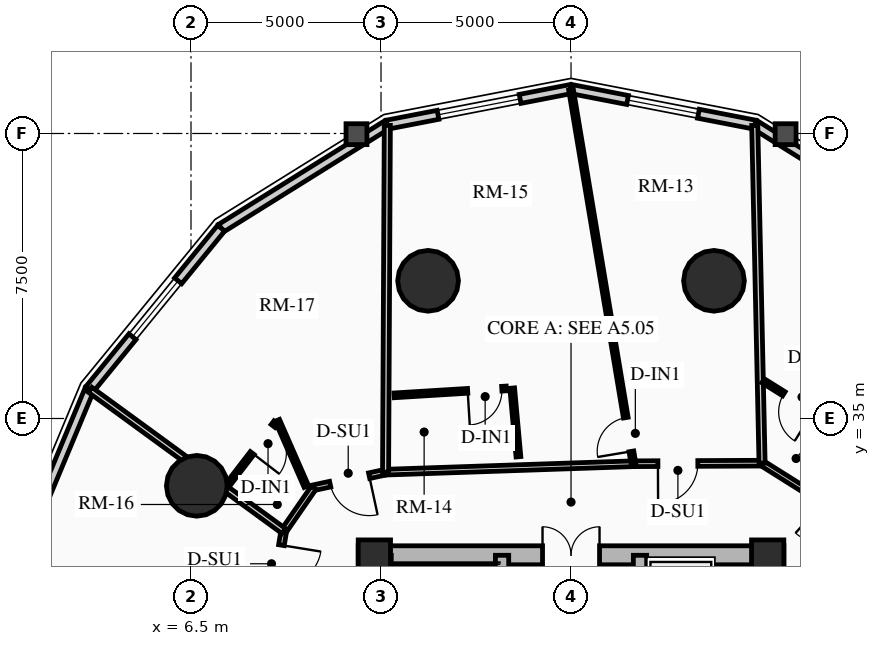
"""IFC4 building model, lengths in metres.
Left out: names, types, materials, properties, quantities, classifications, styles, units other than length and angle.
Written with IfcOpenShell. Run it as: python <this file> out.ifc"""

import sys

from ifc_helpers import new_model, si_unit, direction, frame, frame_2d, origin, origin_2d, place, context, subcontext, project, spatial, rectangle, circle, extrude, source, transform, mapped, element, fill, save


model = new_model("IFC4")
c1 = context("Model", 3, precision=1e-05, world=origin(), true_north=direction((0.0, 1.0)))
c2 = subcontext(c1, "Body", "Model", "MODEL_VIEW")
j1 = project(units=[si_unit("LENGTHUNIT", "METRE"), si_unit("PLANEANGLEUNIT", "RADIAN")], contexts=[c1])
p1 = place(None, origin())
s1 = spatial("IfcSite", under=j1, at=p1, CompositionType="ELEMENT")
p2 = place(p1, origin())
s2 = spatial("IfcBuilding", under=s1, at=p2, CompositionType="ELEMENT")
p3 = place(p2, frame((0.0, 0.0, 54.01)))
s3 = spatial("IfcBuildingStorey", under=s2, at=p3, CompositionType="ELEMENT", Elevation=54.01)
for number, where, z_axis, x_axis in (
    (1, (11.15, 17.35, 0.0), (0.0, 0.0, 1.0), (0.0, 1.0, 0.0)),
    (2, (21.85, 17.35, 0.0), (0.0, 0.0, 1.0), (0.0, 1.0, 0.0)),
):
    element("IfcWall", number, at=place(p3, frame(where, z_axis=z_axis, x_axis=x_axis)), inside=s3, PredefinedType="SHEAR", context=c2, shape_type="SweptSolid", body=[
        extrude(rectangle(XDim=14.3, YDim=0.5, at=frame_2d((7.15, 0.0))), origin(), (0.0, 0.0, 1.0), 2.91),
    ])
p4 = place(p3, frame((11.15, 31.4, 0.0), z_axis=(0.0, 0.0, 1.0), x_axis=(1.0, 0.0, 0.0)))
e3 = element("IfcWall", 3, at=p4, inside=s3, PredefinedType="SHEAR", context=c2, shape_type="SweptSolid", body=[
    extrude(rectangle(XDim=10.7, YDim=0.5, at=frame_2d((5.35, 0.0))), origin(), (0.0, 0.0, 1.0), 2.91),
])
m1 = source(origin(), c2, "Body", "SweptSolid", [
    extrude(rectangle(XDim=1.5, YDim=2.02, at=frame_2d((0.75, 1.01))), frame((0.0, 0.26, 0.0), z_axis=(0.0, -1.0, 0.0), x_axis=(1.0, 0.0, 0.0)), (0.0, 0.0, 1.0), 0.52),
])
p5 = place(p4, frame((4.6, 0.0, 0.0)))
e4 = element("IfcOpeningElement", 4, at=p5, cuts=e3, PredefinedType="OPENING", context=c2, shape_type="MappedRepresentation", body=[
    mapped(m1, transform((0.0, 0.0, 0.0), x_axis=(1.0, 0.0, 0.0), y_axis=(0.0, 1.0, 0.0), z_axis=(0.0, 0.0, 1.0), scale=1.0)),
])
p6 = place(p3, frame((14.685, 17.6, 0.0), z_axis=(0.0, 0.0, 1.0), x_axis=(0.0, 1.0, 0.0)))
e5 = element("IfcWall", 5, at=p6, inside=s3, PredefinedType="SHEAR", context=c2, shape_type="SweptSolid", body=[
    extrude(rectangle(XDim=13.8, YDim=0.35, at=frame_2d((6.9, 0.0))), origin(), (0.0, 0.0, 1.0), 2.91),
])
m2 = source(origin(), c2, "Body", "SweptSolid", [
    extrude(rectangle(XDim=1.1, YDim=2.015, at=frame_2d((0.55, 1.007))), frame((0.0, 0.185, 0.0), z_axis=(0.0, -1.0, 0.0), x_axis=(1.0, 0.0, 0.0)), (0.0, 0.0, 1.0), 0.37),
])
p7 = place(p6, frame((4.9, 0.0, 0.0)))
e6 = element("IfcOpeningElement", 6, at=p7, cuts=e5, PredefinedType="OPENING", context=c2, shape_type="MappedRepresentation", body=[
    mapped(m2, transform((0.0, 0.0, 0.0), x_axis=(1.0, 0.0, 0.0), y_axis=(0.0, 1.0, 0.0), z_axis=(0.0, 0.0, 1.0), scale=1.0)),
])
m3 = source(origin(), c2, "Body", "SweptSolid", [
    extrude(rectangle(XDim=1.15, YDim=2.02, at=frame_2d((0.575, 1.01))), frame((0.0, 0.185, 0.0), z_axis=(0.0, -1.0, 0.0), x_axis=(1.0, 0.0, 0.0)), (0.0, 0.0, 1.0), 0.37),
])
p8 = place(p6, frame((7.32, 0.0, 0.0)))
e7 = element("IfcOpeningElement", 7, at=p8, cuts=e5, PredefinedType="OPENING", context=c2, shape_type="MappedRepresentation", body=[
    mapped(m3, transform((0.0, 0.0, 0.0), x_axis=(1.0, 0.0, 0.0), y_axis=(0.0, 1.0, 0.0), z_axis=(0.0, 0.0, 1.0), scale=1.0)),
])
p9 = place(p3, frame((18.315, 17.6, 0.0), z_axis=(0.0, 0.0, 1.0), x_axis=(0.0, 1.0, 0.0)))
e8 = element("IfcWall", 8, at=p9, inside=s3, PredefinedType="SHEAR", context=c2, shape_type="SweptSolid", body=[
    extrude(rectangle(XDim=13.8, YDim=0.35, at=frame_2d((6.9, 0.0))), origin(), (0.0, 0.0, 1.0), 2.91),
])
p10 = place(p9, frame((10.025, 0.0, 0.0)))
e9 = element("IfcOpeningElement", 9, at=p10, cuts=e8, PredefinedType="OPENING", context=c2, shape_type="MappedRepresentation", body=[
    mapped(m2, transform((0.0, 0.0, 0.0), x_axis=(1.0, 0.0, 0.0), y_axis=(0.0, 1.0, 0.0), z_axis=(0.0, 0.0, 1.0), scale=1.0)),
])
p11 = place(p9, frame((12.025, 0.0, 0.0)))
e10 = element("IfcOpeningElement", 10, at=p11, cuts=e8, PredefinedType="OPENING", context=c2, shape_type="MappedRepresentation", body=[
    mapped(m2, transform((0.0, 0.0, 0.0), x_axis=(1.0, 0.0, 0.0), y_axis=(0.0, 1.0, 0.0), z_axis=(0.0, 0.0, 1.0), scale=1.0)),
])
p12 = place(p9, frame((5.33, 0.0, 0.0)))
e11 = element("IfcOpeningElement", 11, at=p12, cuts=e8, PredefinedType="OPENING", context=c2, shape_type="MappedRepresentation", body=[
    mapped(m3, transform((0.0, 0.0, 0.0), x_axis=(1.0, 0.0, 0.0), y_axis=(0.0, 1.0, 0.0), z_axis=(0.0, 0.0, 1.0), scale=1.0)),
])
p13 = place(p3, frame((11.595, 24.655, 0.0), z_axis=(0.0, 0.0, 1.0), x_axis=(0.0, 1.0, 0.0)))
e12 = element("IfcWall", 12, at=p13, inside=s3, PredefinedType="SHEAR", context=c2, shape_type="SweptSolid", body=[
    extrude(rectangle(XDim=6.745, YDim=0.35, at=frame_2d((3.373, 0.0))), origin(), (0.0, 0.0, 1.0), 2.91),
])
for number, where, z_axis, x_axis in (
    (13, (11.325, 31.38, 0.0), (0.0, 0.0, 1.0), (1.0, 0.0, 0.0)),
    (14, (21.675, 31.38, 0.0), (0.0, 0.0, 1.0), (1.0, 0.0, 0.0)),
):
    element("IfcColumn", number, at=place(p3, frame(where, z_axis=z_axis, x_axis=x_axis)), inside=s3, PredefinedType="COLUMN", context=c2, shape_type="SweptSolid", body=[
        extrude(rectangle(XDim=0.85, YDim=0.85, at=origin_2d()), origin(), (0.0, 0.0, 1.0), 2.91),
    ])
for number, where, z_axis, x_axis in (
    (15, (20.261, 38.623, 0.0), (0.0, 0.0, 1.0), (1.0, 0.0, 0.0)),
    (16, (12.739, 38.623, 0.0), (0.0, 0.0, 1.0), (1.0, 0.0, 0.0)),
    (17, (6.653, 33.229, 0.0), (0.0, 0.0, 1.0), (1.0, 0.0, 0.0)),
):
    element("IfcColumn", number, at=place(p3, frame(where, z_axis=z_axis, x_axis=x_axis)), inside=s3, PredefinedType="USERDEFINED", context=c2, shape_type="SweptSolid", body=[
        extrude(circle(Radius=0.8, at=origin_2d()), origin(), (0.0, 0.0, 1.0), 2.91),
    ])
p14 = place(p3, frame((21.34, 42.732, 0.0), z_axis=(0.0, 0.0, 1.0), x_axis=(0.848533613342, -0.529141481107, 0.0)))
e18 = element("IfcWall", 18, at=p14, inside=s3, PredefinedType="SOLIDWALL", context=c2, shape_type="SweptSolid", body=[
    extrude(rectangle(XDim=5.146, YDim=0.24, at=frame_2d((2.573, 0.0))), origin(), (0.0, 0.0, 1.0), 2.073),
])
p15 = place(p3, frame((16.5, 43.67, 0.0), z_axis=(0.0, 0.0, 1.0), x_axis=(0.981725274071, -0.190303668512, 0.0)))
e19 = element("IfcWall", 19, at=p15, inside=s3, PredefinedType="SOLIDWALL", context=c2, shape_type="SweptSolid", body=[
    extrude(rectangle(XDim=4.93, YDim=0.24, at=frame_2d((2.465, 0.0))), origin(), (0.0, 0.0, 1.0), 2.073),
])
m4 = source(origin(), c2, "Body", "SweptSolid", [
    extrude(rectangle(XDim=1.9, YDim=1.35, at=frame_2d((0.95, 0.675))), frame((0.0, 0.13, 0.0), z_axis=(0.0, -1.0, 0.0), x_axis=(1.0, 0.0, 0.0)), (0.0, 0.0, 1.0), 0.26),
])
p16 = place(p15, frame((1.515, 0.0, 0.65)))
e20 = element("IfcOpeningElement", 20, at=p16, cuts=e19, PredefinedType="OPENING", context=c2, shape_type="MappedRepresentation", body=[
    mapped(m4, transform((0.0, 0.0, 0.0), x_axis=(1.0, 0.0, 0.0), y_axis=(0.0, 1.0, 0.0), z_axis=(0.0, 0.0, 1.0), scale=1.0)),
])
p17 = place(p3, frame((11.66, 42.732, 0.0), z_axis=(0.0, 0.0, 1.0), x_axis=(0.981725274071, 0.190303668512, 0.0)))
e21 = element("IfcWall", 21, at=p17, inside=s3, PredefinedType="SOLIDWALL", context=c2, shape_type="SweptSolid", body=[
    extrude(rectangle(XDim=4.93, YDim=0.24, at=frame_2d((2.465, 0.0))), origin(), (0.0, 0.0, 1.0), 2.073),
])
m5 = source(origin(), c2, "Body", "SweptSolid", [
    extrude(rectangle(XDim=2.2, YDim=1.35, at=frame_2d((1.1, 0.675))), frame((0.0, 0.13, 0.0), z_axis=(0.0, -1.0, 0.0), x_axis=(1.0, 0.0, 0.0)), (0.0, 0.0, 1.0), 0.26),
])
p18 = place(p17, frame((1.365, 0.0, 0.65)))
e22 = element("IfcOpeningElement", 22, at=p18, cuts=e21, PredefinedType="OPENING", context=c2, shape_type="MappedRepresentation", body=[
    mapped(m5, transform((0.0, 0.0, 0.0), x_axis=(1.0, 0.0, 0.0), y_axis=(0.0, 1.0, 0.0), z_axis=(0.0, 0.0, 1.0), scale=1.0)),
])
p19 = place(p3, frame((7.293, 40.009, 0.0), z_axis=(0.0, 0.0, 1.0), x_axis=(0.848533613342, 0.529141481107, 0.0)))
e23 = element("IfcWall", 23, at=p19, inside=s3, PredefinedType="SOLIDWALL", context=c2, shape_type="SweptSolid", body=[
    extrude(rectangle(XDim=5.146, YDim=0.24, at=frame_2d((2.573, 0.0))), origin(), (0.0, 0.0, 1.0), 2.073),
])
p20 = place(p3, frame((3.828, 35.768, 0.0), z_axis=(0.0, 0.0, 1.0), x_axis=(0.632713287022, 0.77438614168, 0.0)))
e24 = element("IfcWall", 24, at=p20, inside=s3, PredefinedType="SOLIDWALL", context=c2, shape_type="SweptSolid", body=[
    extrude(rectangle(XDim=5.477, YDim=0.24, at=frame_2d((2.738, 0.0))), origin(), (0.0, 0.0, 1.0), 2.073),
])
p21 = place(p20, frame((1.788, 0.0, 0.65)))
e25 = element("IfcOpeningElement", 25, at=p21, cuts=e24, PredefinedType="OPENING", context=c2, shape_type="MappedRepresentation", body=[
    mapped(m4, transform((0.0, 0.0, 0.0), x_axis=(1.0, 0.0, 0.0), y_axis=(0.0, 1.0, 0.0), z_axis=(0.0, 0.0, 1.0), scale=1.0)),
])
p22 = place(p3, frame((1.604, 30.424, 0.0), z_axis=(0.0, 0.0, 1.0), x_axis=(0.384348836956, 0.923187939442, 0.0)))
e26 = element("IfcWall", 26, at=p22, inside=s3, PredefinedType="SOLIDWALL", context=c2, shape_type="SweptSolid", body=[
    extrude(rectangle(XDim=5.789, YDim=0.24, at=frame_2d((2.894, 0.0))), origin(), (0.0, 0.0, 1.0), 2.073),
])
p23 = place(p3, frame((22.877, 32.976, 0.0), z_axis=(0.0, 0.0, 1.0), x_axis=(-0.846723232687, 0.532033614754, 0.0)))
e27 = element("IfcWall", 27, at=p23, inside=s3, PredefinedType="PARTITIONING", context=c2, shape_type="SweptSolid", body=[
    extrude(rectangle(XDim=1.595, YDim=0.15, at=frame_2d((0.797, 0.0))), origin(), (0.0, 0.0, 1.0), 2.205),
])
p24 = place(p3, frame((21.527, 33.824, 0.0), z_axis=(0.0, 0.0, 1.0), x_axis=(-0.999990631344, -0.00432865146, 0.0)))
e28 = element("IfcWall", 28, at=p24, inside=s3, PredefinedType="PARTITIONING", context=c2, shape_type="SweptSolid", body=[
    extrude(rectangle(XDim=3.384, YDim=0.15, at=frame_2d((1.692, 0.0))), origin(), (0.0, 0.0, 1.0), 2.159),
])
m6 = source(origin(), c2, "Body", "SweptSolid", [
    extrude(rectangle(XDim=1.05, YDim=2.015, at=frame_2d((0.525, 1.007))), frame((0.0, 0.085, 0.0), z_axis=(0.0, -1.0, 0.0), x_axis=(1.0, 0.0, 0.0)), (0.0, 0.0, 1.0), 0.17),
])
p25 = place(p24, frame((1.69, 0.0, 0.0)))
e29 = element("IfcOpeningElement", 29, at=p25, cuts=e28, PredefinedType="OPENING", context=c2, shape_type="MappedRepresentation", body=[
    mapped(m6, transform((0.0, 0.0, 0.0), x_axis=(1.0, 0.0, 0.0), y_axis=(0.0, 1.0, 0.0), z_axis=(0.0, 0.0, 1.0), scale=1.0)),
])
p26 = place(p3, frame((18.143, 33.81, 0.0), z_axis=(0.0, 0.0, 1.0), x_axis=(-0.999423023908, -0.033964971394, 0.0)))
e30 = element("IfcWall", 30, at=p26, inside=s3, PredefinedType="PARTITIONING", context=c2, shape_type="SweptSolid", body=[
    extrude(rectangle(XDim=6.527, YDim=0.15, at=frame_2d((3.263, 0.0))), origin(), (0.0, 0.0, 1.0), 2.159),
])
p27 = place(p3, frame((11.62, 33.588, 0.0), z_axis=(0.0, 0.0, 1.0), x_axis=(-0.977392314559, -0.211433827571, 0.0)))
e31 = element("IfcWall", 31, at=p27, inside=s3, PredefinedType="PARTITIONING", context=c2, shape_type="SweptSolid", body=[
    extrude(rectangle(XDim=1.934, YDim=0.15, at=frame_2d((0.967, 0.0))), origin(), (0.0, 0.0, 1.0), 2.159),
])
p28 = place(p27, frame((0.442, 0.0, 0.0)))
e32 = element("IfcOpeningElement", 32, at=p28, cuts=e31, PredefinedType="OPENING", context=c2, shape_type="MappedRepresentation", body=[
    mapped(m6, transform((0.0, 0.0, 0.0), x_axis=(1.0, 0.0, 0.0), y_axis=(0.0, 1.0, 0.0), z_axis=(0.0, 0.0, 1.0), scale=1.0)),
])
p29 = place(p3, frame((9.729, 33.179, 0.0), z_axis=(0.0, 0.0, 1.0), x_axis=(-0.569155068352, -0.822230203878, 0.0)))
e33 = element("IfcWall", 33, at=p29, inside=s3, PredefinedType="PARTITIONING", context=c2, shape_type="SweptSolid", body=[
    extrude(rectangle(XDim=1.387, YDim=0.15, at=frame_2d((0.694, 0.0))), origin(), (0.0, 0.0, 1.0), 2.159),
])
p30 = place(p3, frame((8.94, 32.038, 0.0), z_axis=(0.0, 0.0, 1.0), x_axis=(-0.159917336462, -0.987130409571, 0.0)))
e34 = element("IfcWall", 34, at=p30, inside=s3, PredefinedType="PARTITIONING", context=c2, shape_type="SweptSolid", body=[
    extrude(rectangle(XDim=1.547, YDim=0.15, at=frame_2d((0.773, 0.0))), origin(), (0.0, 0.0, 1.0), 2.205),
])
p31 = place(p30, frame((0.377, 0.0, 0.0)))
e35 = element("IfcOpeningElement", 35, at=p31, cuts=e34, PredefinedType="OPENING", context=c2, shape_type="MappedRepresentation", body=[
    mapped(m6, transform((0.0, 0.0, 0.0), x_axis=(1.0, 0.0, 0.0), y_axis=(0.0, 1.0, 0.0), z_axis=(0.0, 0.0, 1.0), scale=1.0)),
])
p32 = place(p3, frame((21.527, 33.824, 0.0), z_axis=(0.0, 0.0, 1.0), x_axis=(-0.021694017061, 0.999764657119, 0.0)))
e36 = element("IfcWall", 36, at=p32, inside=s3, PredefinedType="PARTITIONING", context=c2, shape_type="SweptSolid", body=[
    extrude(rectangle(XDim=8.891, YDim=0.16, at=frame_2d((4.445, 0.0))), origin(), (0.0, 0.0, 1.0), 2.073),
])
p33 = place(p3, frame((11.62, 33.588, 0.0), z_axis=(0.0, 0.0, 1.0), x_axis=(0.005056791532, 0.999987214348, 0.0)))
e37 = element("IfcWall", 37, at=p33, inside=s3, PredefinedType="PARTITIONING", context=c2, shape_type="SweptSolid", body=[
    extrude(rectangle(XDim=9.125, YDim=0.16, at=frame_2d((4.562, 0.0))), origin(), (0.0, 0.0, 1.0), 2.073),
])
p34 = place(p3, frame((8.94, 32.038, 0.0), z_axis=(0.0, 0.0, 1.0), x_axis=(-0.807831293846, 0.58941377714, 0.0)))
e38 = element("IfcWall", 38, at=p34, inside=s3, PredefinedType="PARTITIONING", context=c2, shape_type="SweptSolid", body=[
    extrude(rectangle(XDim=6.308, YDim=0.16, at=frame_2d((3.154, 0.0))), origin(), (0.0, 0.0, 1.0), 2.073),
])
p35 = place(p3, frame((23.233, 34.941, 0.0), z_axis=(0.0, 0.0, 1.0), x_axis=(-0.84760373009, 0.53062973601, 0.0)))
e39 = element("IfcWall", 39, at=p35, inside=s3, PredefinedType="PARTITIONING", context=c2, shape_type="SweptSolid", body=[
    extrude(rectangle(XDim=1.983, YDim=0.125, at=frame_2d((0.991, 0.0))), origin(), (0.0, 0.0, 1.0), 2.635),
])
m7 = source(origin(), c2, "Body", "SweptSolid", [
    extrude(rectangle(XDim=0.9, YDim=2.005, at=frame_2d((0.45, 1.002))), frame((0.0, 0.073, 0.0), z_axis=(0.0, -1.0, 0.0), x_axis=(1.0, 0.0, 0.0)), (0.0, 0.0, 1.0), 0.145),
])
p36 = place(p35, frame((0.436, 0.0, 0.0)))
e40 = element("IfcOpeningElement", 40, at=p36, cuts=e39, PredefinedType="OPENING", context=c2, shape_type="MappedRepresentation", body=[
    mapped(m7, transform((0.0, 0.0, 0.0), x_axis=(1.0, 0.0, 0.0), y_axis=(0.0, 1.0, 0.0), z_axis=(0.0, 0.0, 1.0), scale=1.0)),
])
p37 = place(p3, frame((18.143, 33.81, 0.0), z_axis=(0.0, 0.0, 1.0), x_axis=(-0.164668829219, 0.986348912243, 0.0)))
e41 = element("IfcWall", 41, at=p37, inside=s3, PredefinedType="PARTITIONING", context=c2, shape_type="SweptSolid", body=[
    extrude(rectangle(XDim=9.977, YDim=0.125, at=frame_2d((4.988, 0.0))), origin(), (0.0, 0.0, 1.0), 2.073),
])
p38 = place(p37, frame((0.33, 0.0, 0.0)))
e42 = element("IfcOpeningElement", 42, at=p38, cuts=e41, PredefinedType="OPENING", context=c2, shape_type="MappedRepresentation", body=[
    mapped(m7, transform((0.0, 0.0, 0.0), x_axis=(1.0, 0.0, 0.0), y_axis=(0.0, 1.0, 0.0), z_axis=(0.0, 0.0, 1.0), scale=1.0)),
])
p39 = place(p3, frame((15.116, 33.993, 0.0), z_axis=(0.0, 0.0, 1.0), x_axis=(-0.090547877021, 0.995892103577, 0.0)))
e43 = element("IfcWall", 43, at=p39, inside=s3, PredefinedType="PARTITIONING", context=c2, shape_type="SweptSolid", body=[
    extrude(rectangle(XDim=1.815, YDim=0.125, at=frame_2d((0.907, 0.0))), origin(), (0.0, 0.0, 1.0), 2.635),
])
p40 = place(p3, frame((14.798, 35.791, 0.0), z_axis=(0.0, 0.0, 1.0), x_axis=(-0.998108365817, -0.06147918417, 0.0)))
e44 = element("IfcWall", 44, at=p40, inside=s3, PredefinedType="PARTITIONING", context=c2, shape_type="SweptSolid", body=[
    extrude(rectangle(XDim=2.958, YDim=0.125, at=frame_2d((1.479, 0.0))), origin(), (0.0, 0.0, 1.0), 2.159),
])
p41 = place(p40, frame((0.12, 0.0, 0.0)))
e45 = element("IfcOpeningElement", 45, at=p41, cuts=e44, PredefinedType="OPENING", context=c2, shape_type="MappedRepresentation", body=[
    mapped(m7, transform((0.0, 0.0, 0.0), x_axis=(1.0, 0.0, 0.0), y_axis=(0.0, 1.0, 0.0), z_axis=(0.0, 0.0, 1.0), scale=1.0)),
])
p42 = place(p3, frame((9.535, 33.211, 0.0), z_axis=(0.0, 0.0, 1.0), x_axis=(-0.401687955793, 0.915776602765, 0.0)))
e46 = element("IfcWall", 46, at=p42, inside=s3, PredefinedType="PARTITIONING", context=c2, shape_type="SweptSolid", body=[
    extrude(rectangle(XDim=1.901, YDim=0.125, at=frame_2d((0.95, 0.0))), origin(), (0.0, 0.0, 1.0), 2.635),
])
p43 = place(p3, frame((8.732, 34.899, 0.0), z_axis=(0.0, 0.0, 1.0), x_axis=(-0.609677010074, -0.792649950096, 0.0)))
e47 = element("IfcWall", 47, at=p43, inside=s3, PredefinedType="PARTITIONING", context=c2, shape_type="SweptSolid", body=[
    extrude(rectangle(XDim=2.097, YDim=0.125, at=frame_2d((1.049, 0.0))), origin(), (0.0, 0.0, 1.0), 2.073),
])
p44 = place(p43, frame((0.12, 0.0, 0.0)))
e48 = element("IfcOpeningElement", 48, at=p44, cuts=e47, PredefinedType="OPENING", context=c2, shape_type="MappedRepresentation", body=[
    mapped(m7, transform((0.0, 0.0, 0.0), x_axis=(1.0, 0.0, 0.0), y_axis=(0.0, 1.0, 0.0), z_axis=(0.0, 0.0, 1.0), scale=1.0)),
])
m8 = source(origin(), c2, "Body", "SweptSolid", [
    extrude(rectangle(XDim=1.9, YDim=1.35, at=frame_2d((0.95, 0.675))), frame((0.0, 0.03, 0.0), z_axis=(0.0, -1.0, 0.0), x_axis=(1.0, 0.0, 0.0)), (0.0, 0.0, 1.0), 0.06),
])
p45 = place(p16, origin())
e49 = element("IfcWindow", 49, at=p45, inside=s3, PartitioningType="DOUBLE_PANEL_VERTICAL", PredefinedType="WINDOW", context=c2, shape_type="MappedRepresentation", body=[
    mapped(m8, transform((0.0, 0.0, 0.0), x_axis=(1.0, 0.0, 0.0), y_axis=(0.0, 1.0, 0.0), z_axis=(0.0, 0.0, 1.0), scale=1.0)),
])
fill(e20, e49)
m9 = source(origin(), c2, "Body", "SweptSolid", [
    extrude(rectangle(XDim=2.2, YDim=1.35, at=frame_2d((1.1, 0.675))), frame((0.0, 0.03, 0.0), z_axis=(0.0, -1.0, 0.0), x_axis=(1.0, 0.0, 0.0)), (0.0, 0.0, 1.0), 0.06),
])
p46 = place(p18, origin())
e50 = element("IfcWindow", 50, at=p46, inside=s3, PartitioningType="DOUBLE_PANEL_VERTICAL", PredefinedType="WINDOW", context=c2, shape_type="MappedRepresentation", body=[
    mapped(m9, transform((0.0, 0.0, 0.0), x_axis=(1.0, 0.0, 0.0), y_axis=(0.0, 1.0, 0.0), z_axis=(0.0, 0.0, 1.0), scale=1.0)),
])
fill(e22, e50)
p47 = place(p21, origin())
e51 = element("IfcWindow", 51, at=p47, inside=s3, PartitioningType="DOUBLE_PANEL_VERTICAL", PredefinedType="WINDOW", context=c2, shape_type="MappedRepresentation", body=[
    mapped(m8, transform((0.0, 0.0, 0.0), x_axis=(1.0, 0.0, 0.0), y_axis=(0.0, 1.0, 0.0), z_axis=(0.0, 0.0, 1.0), scale=1.0)),
])
fill(e25, e51)
m10 = source(origin(), c2, "Body", "SweptSolid", [
    extrude(rectangle(XDim=1.5, YDim=2.02, at=frame_2d((0.75, 1.01))), frame((0.0, 0.025, 0.0), z_axis=(0.0, -1.0, 0.0), x_axis=(1.0, 0.0, 0.0)), (0.0, 0.0, 1.0), 0.05),
])
p48 = place(p5, origin())
e52 = element("IfcDoor", 52, at=p48, inside=s3, OperationType="DOUBLE_DOOR_SINGLE_SWING", PredefinedType="DOOR", context=c2, shape_type="MappedRepresentation", body=[
    mapped(m10, transform((0.0, 0.0, 0.0), x_axis=(1.0, 0.0, 0.0), y_axis=(0.0, 1.0, 0.0), z_axis=(0.0, 0.0, 1.0), scale=1.0)),
])
fill(e4, e52)
m11 = source(origin(), c2, "Body", "SweptSolid", [
    extrude(rectangle(XDim=0.9, YDim=2.005, at=frame_2d((0.45, 1.002))), frame((0.0, 0.025, 0.0), z_axis=(0.0, -1.0, 0.0), x_axis=(1.0, 0.0, 0.0)), (0.0, 0.0, 1.0), 0.05),
])
p49 = place(p36, origin())
e53 = element("IfcDoor", 53, at=p49, inside=s3, OperationType="SINGLE_SWING_LEFT", PredefinedType="DOOR", context=c2, shape_type="MappedRepresentation", body=[
    mapped(m11, transform((0.0, 0.0, 0.0), x_axis=(1.0, 0.0, 0.0), y_axis=(0.0, 1.0, 0.0), z_axis=(0.0, 0.0, 1.0), scale=1.0)),
])
fill(e40, e53)
m12 = source(origin(), c2, "Body", "SweptSolid", [
    extrude(rectangle(XDim=1.05, YDim=2.015, at=frame_2d((0.525, 1.007))), frame((0.0, 0.025, 0.0), z_axis=(0.0, -1.0, 0.0), x_axis=(1.0, 0.0, 0.0)), (0.0, 0.0, 1.0), 0.05),
])
p50 = place(p25, origin())
e54 = element("IfcDoor", 54, at=p50, inside=s3, OperationType="SINGLE_SWING_RIGHT", PredefinedType="DOOR", context=c2, shape_type="MappedRepresentation", body=[
    mapped(m12, transform((0.0, 0.0, 0.0), x_axis=(1.0, 0.0, 0.0), y_axis=(0.0, 1.0, 0.0), z_axis=(0.0, 0.0, 1.0), scale=1.0)),
])
fill(e29, e54)
p51 = place(p38, origin())
e55 = element("IfcDoor", 55, at=p51, inside=s3, OperationType="SINGLE_SWING_LEFT", PredefinedType="DOOR", context=c2, shape_type="MappedRepresentation", body=[
    mapped(m11, transform((0.0, 0.0, 0.0), x_axis=(1.0, 0.0, 0.0), y_axis=(0.0, 1.0, 0.0), z_axis=(0.0, 0.0, 1.0), scale=1.0)),
])
fill(e42, e55)
p52 = place(p41, origin())
e56 = element("IfcDoor", 56, at=p52, inside=s3, OperationType="SINGLE_SWING_RIGHT", PredefinedType="DOOR", context=c2, shape_type="MappedRepresentation", body=[
    mapped(m11, transform((0.0, 0.0, 0.0), x_axis=(1.0, 0.0, 0.0), y_axis=(0.0, 1.0, 0.0), z_axis=(0.0, 0.0, 1.0), scale=1.0)),
])
fill(e45, e56)
p53 = place(p28, origin())
e57 = element("IfcDoor", 57, at=p53, inside=s3, OperationType="SINGLE_SWING_LEFT", PredefinedType="DOOR", context=c2, shape_type="MappedRepresentation", body=[
    mapped(m12, transform((0.0, 0.0, 0.0), x_axis=(1.0, 0.0, 0.0), y_axis=(0.0, 1.0, 0.0), z_axis=(0.0, 0.0, 1.0), scale=1.0)),
])
fill(e32, e57)
p54 = place(p44, origin())
e58 = element("IfcDoor", 58, at=p54, inside=s3, OperationType="SINGLE_SWING_RIGHT", PredefinedType="DOOR", context=c2, shape_type="MappedRepresentation", body=[
    mapped(m11, transform((0.0, 0.0, 0.0), x_axis=(1.0, 0.0, 0.0), y_axis=(0.0, 1.0, 0.0), z_axis=(0.0, 0.0, 1.0), scale=1.0)),
])
fill(e48, e58)
p55 = place(p31, origin())
e59 = element("IfcDoor", 59, at=p55, inside=s3, OperationType="SINGLE_SWING_LEFT", PredefinedType="DOOR", context=c2, shape_type="MappedRepresentation", body=[
    mapped(m12, transform((0.0, 0.0, 0.0), x_axis=(1.0, 0.0, 0.0), y_axis=(0.0, 1.0, 0.0), z_axis=(0.0, 0.0, 1.0), scale=1.0)),
])
fill(e35, e59)
save(model, sys.argv[1])
